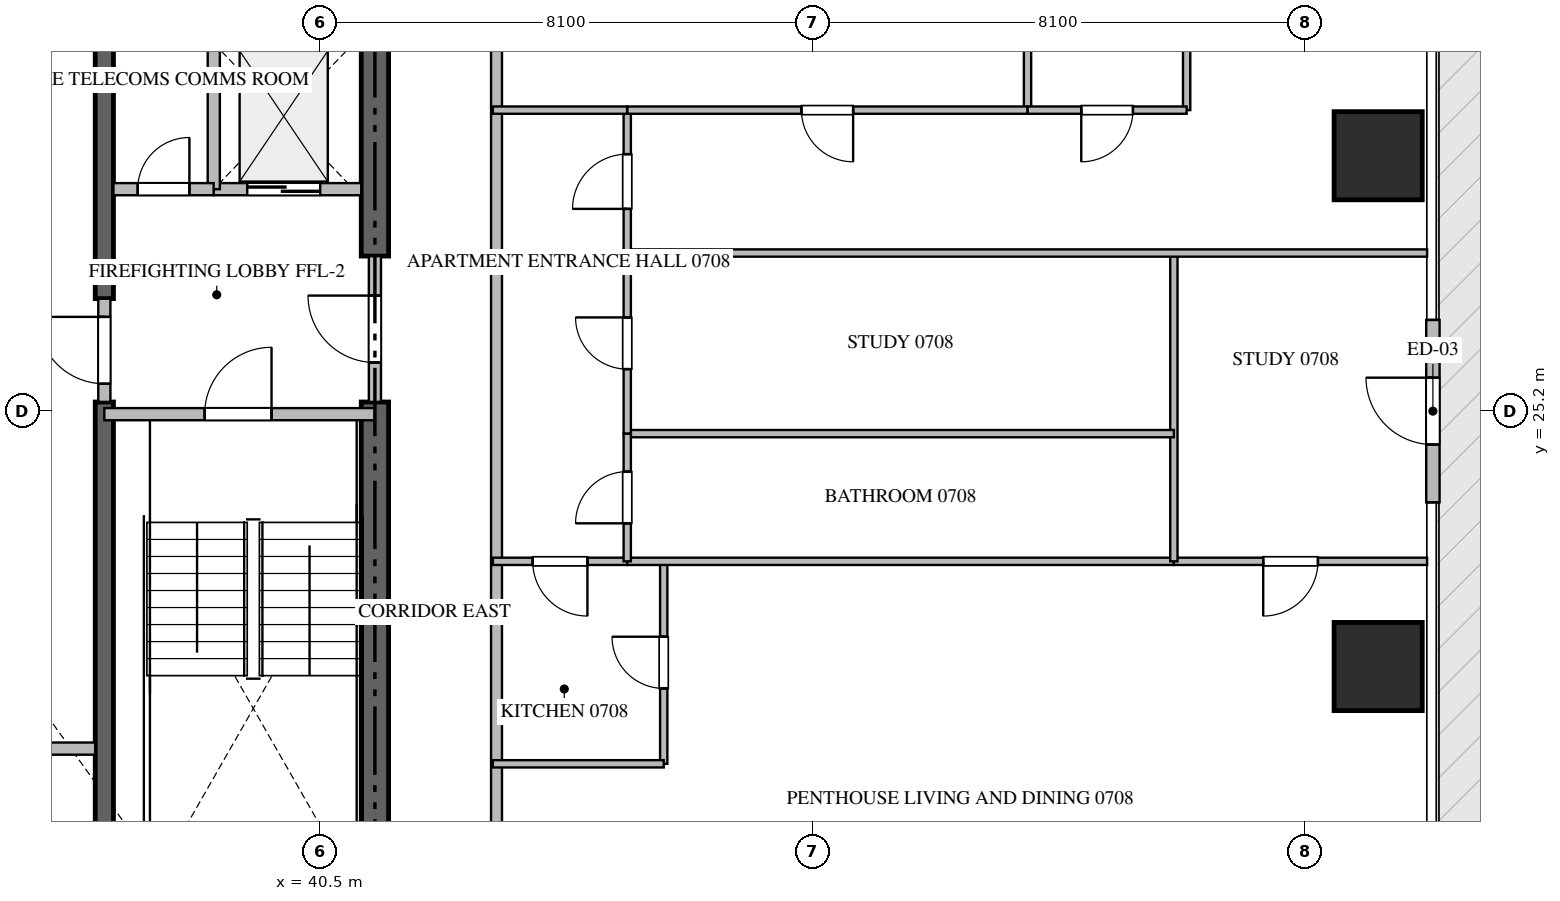
"""IFC4 building model, lengths in metres.
Left out: names, types, materials, properties, quantities, classifications, styles, units other than length and angle.
Written with IfcOpenShell. Run it as: python <this file> out.ifc"""

import sys

from ifc_helpers import new_model, si_unit, direction, frame, frame_2d, origin, origin_2d, place, context, subcontext, project, spatial, rectangle, extrude, source, transform, mapped, element, fill, save


model = new_model("IFC4")
c1 = context("Model", 3, precision=1e-05, world=origin(), true_north=direction((0.0, 1.0)))
c2 = subcontext(c1, "Body", "Model", "MODEL_VIEW")
j1 = project(units=[si_unit("LENGTHUNIT", "METRE"), si_unit("PLANEANGLEUNIT", "RADIAN")], contexts=[c1])
p1 = place(None, origin())
s1 = spatial("IfcSite", under=j1, at=p1, CompositionType="ELEMENT")
p2 = place(p1, origin())
s2 = spatial("IfcBuilding", under=s1, at=p2, CompositionType="ELEMENT")
p3 = place(p2, frame((0.0, 0.0, 34.2)))
s3 = spatial("IfcBuildingStorey", under=s2, at=p3, CompositionType="ELEMENT", Elevation=34.2)
p4 = place(p3, frame((41.4, 17.025, -0.26), z_axis=(0.0, 0.0, 1.0), x_axis=(0.0, 1.0, 0.0)))
e1 = element("IfcWall", 1, at=p4, inside=s3, PredefinedType="SHEAR", context=c2, shape_type="SweptSolid", body=[
    extrude(rectangle(XDim=8.325, YDim=0.45, at=frame_2d((4.163, 0.0))), origin(), (0.0, 0.0, 1.0), 3.748),
])
p5 = place(p3, frame((41.4, 27.75, -0.26), z_axis=(0.0, 0.0, 1.0), x_axis=(0.0, 1.0, 0.0)))
e2 = element("IfcWall", 2, at=p5, inside=s3, PredefinedType="SHEAR", context=c2, shape_type="SweptSolid", body=[
    extrude(rectangle(XDim=5.625, YDim=0.45, at=frame_2d((2.812, 0.0))), origin(), (0.0, 0.0, 1.0), 3.748),
])
p6 = place(p3, frame((36.95, 17.025, -0.26), z_axis=(0.0, 0.0, 1.0), x_axis=(0.0, 1.0, 0.0)))
e3 = element("IfcWall", 3, at=p6, inside=s3, PredefinedType="SHEAR", context=c2, shape_type="SweptSolid", body=[
    extrude(rectangle(XDim=8.325, YDim=0.3, at=frame_2d((4.163, 0.0))), origin(), (0.0, 0.0, 1.0), 3.748),
])
p7 = place(p3, frame((36.95, 27.05, -0.26), z_axis=(0.0, 0.0, 1.0), x_axis=(0.0, 1.0, 0.0)))
e4 = element("IfcWall", 4, at=p7, inside=s3, PredefinedType="SHEAR", context=c2, shape_type="SweptSolid", body=[
    extrude(rectangle(XDim=6.325, YDim=0.3, at=frame_2d((3.163, 0.0))), origin(), (0.0, 0.0, 1.0), 3.748),
])
m1 = source(origin(), c2, "Body", "SweptSolid", [
    extrude(rectangle(XDim=1.45, YDim=1.45, at=origin_2d()), origin(), (0.0, 0.0, 1.0), 3.75),
])
for number, where, z_axis, x_axis in (
    (5, (57.9, 21.0, -0.26), (0.0, 0.0, 1.0), (1.0, 0.0, 0.0)),
    (6, (57.9, 29.4, -0.26), (0.0, 0.0, 1.0), (1.0, 0.0, 0.0)),
):
    element("IfcColumn", number, at=place(p3, frame(where, z_axis=z_axis, x_axis=x_axis)), inside=s3, PredefinedType="COLUMN", context=c2, shape_type="MappedRepresentation", body=[
        mapped(m1, transform((0.0, 0.0, 0.0), scale=1.0)),
    ])
p8 = place(p3, frame((58.8, 23.7, 0.0), z_axis=(0.0, 0.0, 1.0), x_axis=(0.0, 1.0, 0.0)))
e7 = element("IfcWall", 7, at=p8, inside=s3, PredefinedType="ELEMENTEDWALL", context=c2, shape_type="SweptSolid", body=[
    extrude(rectangle(XDim=3.0, YDim=0.22, at=frame_2d((1.5, 0.0))), origin(), (0.0, 0.0, 1.0), 3.475),
])
p9 = place(p8, frame((0.95, 0.0, 0.0)))
e8 = element("IfcOpeningElement", 8, at=p9, cuts=e7, PredefinedType="OPENING", context=c2, shape_type="SweptSolid", body=[
    extrude(rectangle(XDim=1.1, YDim=2.2, at=frame_2d((0.55, 1.1))), frame((0.0, 0.12, 0.0), z_axis=(0.0, -1.0, 0.0), x_axis=(1.0, 0.0, 0.0)), (0.0, 0.0, 1.0), 0.24),
])
p10 = place(p3, frame((36.95, 25.15, 0.0), z_axis=(0.0, 0.0, 1.0), x_axis=(1.0, 0.0, 0.0)))
e9 = element("IfcWall", 9, at=p10, inside=s3, PredefinedType="STANDARD", context=c2, shape_type="SweptSolid", body=[
    extrude(rectangle(XDim=4.45, YDim=0.2, at=frame_2d((2.225, 0.0))), origin(), (0.0, 0.0, 1.0), 3.49),
])
p11 = place(p10, frame((1.65, 0.0, 0.0)))
e10 = element("IfcOpeningElement", 10, at=p11, cuts=e9, PredefinedType="OPENING", context=c2, shape_type="SweptSolid", body=[
    extrude(rectangle(XDim=1.1, YDim=2.15, at=frame_2d((0.55, 1.075))), frame((0.0, 0.11, 0.0), z_axis=(0.0, -1.0, 0.0), x_axis=(1.0, 0.0, 0.0)), (0.0, 0.0, 1.0), 0.22),
])
p12 = place(p3, frame((38.75, 28.85, 0.0), z_axis=(0.0, 0.0, 1.0), x_axis=(1.0, 0.0, 0.0)))
e11 = element("IfcWall", 11, at=p12, inside=s3, PredefinedType="STANDARD", context=c2, shape_type="SweptSolid", body=[
    extrude(rectangle(XDim=2.425, YDim=0.2, at=frame_2d((1.212, 0.0))), origin(), (0.0, 0.0, 1.0), 3.49),
])
p13 = place(p12, frame((0.55, 0.0, 0.0)))
e12 = element("IfcOpeningElement", 12, at=p13, cuts=e11, PredefinedType="OPENING", context=c2, shape_type="SweptSolid", body=[
    extrude(rectangle(XDim=1.2, YDim=2.2, at=frame_2d((0.6, 1.1))), frame((0.0, 0.11, 0.0), z_axis=(0.0, -1.0, 0.0), x_axis=(1.0, 0.0, 0.0)), (0.0, 0.0, 1.0), 0.22),
])
p14 = place(p3, frame((33.05, 19.65, 0.0), z_axis=(0.0, 0.0, 1.0), x_axis=(1.0, 0.0, 0.0)))
e13 = element("IfcWall", 13, at=p14, inside=s3, PredefinedType="STANDARD", context=c2, shape_type="SweptSolid", body=[
    extrude(rectangle(XDim=3.75, YDim=0.2, at=frame_2d((1.875, 0.0))), origin(), (0.0, 0.0, 1.0), 3.49),
])
p15 = place(p14, frame((0.65, 0.0, 0.0)))
e14 = element("IfcOpeningElement", 14, at=p15, cuts=e13, PredefinedType="OPENING", context=c2, shape_type="SweptSolid", body=[
    extrude(rectangle(XDim=1.1, YDim=2.2, at=frame_2d((0.55, 1.1))), frame((0.0, 0.11, 0.0), z_axis=(0.0, -1.0, 0.0), x_axis=(1.0, 0.0, 0.0)), (0.0, 0.0, 1.0), 0.22),
])
p16 = place(p3, frame((35.0, 30.65, 0.0), z_axis=(0.0, 0.0, 1.0), x_axis=(1.0, 0.0, 0.0)))
e15 = element("IfcWall", 15, at=p16, inside=s3, PredefinedType="STANDARD", context=c2, shape_type="SweptSolid", body=[
    extrude(rectangle(XDim=1.8, YDim=0.2, at=frame_2d((0.9, 0.0))), origin(), (0.0, 0.0, 1.0), 3.49),
])
p17 = place(p3, frame((38.75, 28.85, 0.0), z_axis=(0.0, 0.0, 1.0), x_axis=(0.0, 1.0, 0.0)))
e16 = element("IfcWall", 16, at=p17, inside=s3, PredefinedType="STANDARD", context=c2, shape_type="SweptSolid", body=[
    extrude(rectangle(XDim=2.5, YDim=0.2, at=frame_2d((1.25, 0.0))), origin(), (0.0, 0.0, 1.0), 3.49),
])
p18 = place(p3, frame((37.1, 28.85, 0.0), z_axis=(0.0, 0.0, 1.0), x_axis=(1.0, 0.0, 0.0)))
e17 = element("IfcWall", 17, at=p18, inside=s3, PredefinedType="STANDARD", context=c2, shape_type="SweptSolid", body=[
    extrude(rectangle(XDim=1.648, YDim=0.2, at=frame_2d((0.824, 0.0))), origin(), (0.0, 0.0, 1.0), 3.49),
])
p19 = place(p18, frame((0.399, 0.0, 0.0)))
e18 = element("IfcOpeningElement", 18, at=p19, cuts=e17, PredefinedType="OPENING", context=c2, shape_type="SweptSolid", body=[
    extrude(rectangle(XDim=0.85, YDim=2.1, at=frame_2d((0.425, 1.05))), frame((0.0, 0.11, 0.0), z_axis=(0.0, -1.0, 0.0), x_axis=(1.0, 0.0, 0.0)), (0.0, 0.0, 1.0), 0.22),
])
p20 = place(p3, frame((41.4, 25.352, 0.0), z_axis=(0.0, 0.0, 1.0), x_axis=(0.0, 1.0, 0.0)))
e19 = element("IfcWall", 19, at=p20, inside=s3, PredefinedType="STANDARD", context=c2, shape_type="SweptSolid", body=[
    extrude(rectangle(XDim=2.396, YDim=0.2, at=frame_2d((1.198, 0.0))), origin(), (0.0, 0.0, 1.0), 3.49),
])
p21 = place(p20, frame((0.648, 0.0, 0.0)))
e20 = element("IfcOpeningElement", 20, at=p21, cuts=e19, PredefinedType="OPENING", context=c2, shape_type="SweptSolid", body=[
    extrude(rectangle(XDim=1.1, YDim=2.15, at=frame_2d((0.55, 1.075))), frame((0.0, 0.11, 0.0), z_axis=(0.0, -1.0, 0.0), x_axis=(1.0, 0.0, 0.0)), (0.0, 0.0, 1.0), 0.22),
])
p22 = place(p3, frame((36.95, 25.352, 0.0), z_axis=(0.0, 0.0, 1.0), x_axis=(0.0, 1.0, 0.0)))
e21 = element("IfcWall", 21, at=p22, inside=s3, PredefinedType="STANDARD", context=c2, shape_type="SweptSolid", body=[
    extrude(rectangle(XDim=1.696, YDim=0.2, at=frame_2d((0.848, 0.0))), origin(), (0.0, 0.0, 1.0), 3.49),
])
p23 = place(p22, frame((0.298, 0.0, 0.0)))
e22 = element("IfcOpeningElement", 22, at=p23, cuts=e21, PredefinedType="OPENING", context=c2, shape_type="SweptSolid", body=[
    extrude(rectangle(XDim=1.1, YDim=2.15, at=frame_2d((0.55, 1.075))), frame((0.0, 0.11, 0.0), z_axis=(0.0, -1.0, 0.0), x_axis=(1.0, 0.0, 0.0)), (0.0, 0.0, 1.0), 0.22),
])
p24 = place(p3, frame((43.4, 14.9, 0.0), z_axis=(0.0, 0.0, 1.0), x_axis=(0.0, 1.0, 0.0)))
e23 = element("IfcWall", 23, at=p24, inside=s3, PredefinedType="PARTITIONING", context=c2, shape_type="SweptSolid", body=[
    extrude(rectangle(XDim=20.6, YDim=0.18, at=frame_2d((10.3, 0.0))), origin(), (0.0, 0.0, 1.0), 3.49),
])
p25 = place(p24, frame((1.96, 0.0, 0.0)))
e24 = element("IfcOpeningElement", 24, at=p25, cuts=e23, PredefinedType="OPENING", context=c2, shape_type="SweptSolid", body=[
    extrude(rectangle(XDim=1.0, YDim=2.15, at=frame_2d((0.5, 1.075))), frame((0.0, 0.1, 0.0), z_axis=(0.0, -1.0, 0.0), x_axis=(1.0, 0.0, 0.0)), (0.0, 0.0, 1.0), 0.2),
])
p26 = place(p3, frame((46.15, 19.4, 0.0), z_axis=(0.0, 0.0, 1.0), x_axis=(0.0, 1.0, 0.0)))
e25 = element("IfcWall", 25, at=p26, inside=s3, PredefinedType="PARTITIONING", context=c2, shape_type="SweptSolid", body=[
    extrude(rectangle(XDim=3.33, YDim=0.12, at=frame_2d((1.665, 0.0))), origin(), (0.0, 0.0, 1.0), 3.49),
])
p27 = place(p26, frame((1.24, 0.0, 0.0)))
e26 = element("IfcOpeningElement", 26, at=p27, cuts=e25, PredefinedType="OPENING", context=c2, shape_type="SweptSolid", body=[
    extrude(rectangle(XDim=0.85, YDim=2.1, at=frame_2d((0.425, 1.05))), frame((0.0, 0.07, 0.0), z_axis=(0.0, -1.0, 0.0), x_axis=(1.0, 0.0, 0.0)), (0.0, 0.0, 1.0), 0.14),
])
p28 = place(p3, frame((46.15, 19.4, 0.0), z_axis=(0.0, 0.0, 1.0), x_axis=(-1.0, 0.0, 0.0)))
e27 = element("IfcWall", 27, at=p28, inside=s3, PredefinedType="PARTITIONING", context=c2, shape_type="SweptSolid", body=[
    extrude(rectangle(XDim=2.81, YDim=0.12, at=frame_2d((1.405, 0.0))), origin(), (0.0, 0.0, 1.0), 3.49),
])
p29 = place(p3, frame((45.55, 22.73, 0.0), z_axis=(0.0, 0.0, 1.0), x_axis=(-1.0, 0.0, 0.0)))
e28 = element("IfcWall", 28, at=p29, inside=s3, PredefinedType="PARTITIONING", context=c2, shape_type="SweptSolid", body=[
    extrude(rectangle(XDim=2.21, YDim=0.12, at=frame_2d((1.105, 0.0))), origin(), (0.0, 0.0, 1.0), 3.49),
])
p30 = place(p29, frame((0.655, 0.0, 0.0)))
e29 = element("IfcOpeningElement", 29, at=p30, cuts=e28, PredefinedType="OPENING", context=c2, shape_type="SweptSolid", body=[
    extrude(rectangle(XDim=0.9, YDim=2.1, at=frame_2d((0.45, 1.05))), frame((0.0, 0.07, 0.0), z_axis=(0.0, -1.0, 0.0), x_axis=(1.0, 0.0, 0.0)), (0.0, 0.0, 1.0), 0.14),
])
p31 = place(p3, frame((58.705, 22.73, 0.0), z_axis=(0.0, 0.0, 1.0), x_axis=(-1.0, 0.0, 0.0)))
e30 = element("IfcWall", 30, at=p31, inside=s3, PredefinedType="PARTITIONING", context=c2, shape_type="SweptSolid", body=[
    extrude(rectangle(XDim=4.165, YDim=0.12, at=frame_2d((2.083, 0.0))), origin(), (0.0, 0.0, 1.0), 3.49),
])
p32 = place(p31, frame((1.796, 0.0, 0.0)))
e31 = element("IfcOpeningElement", 31, at=p32, cuts=e30, PredefinedType="OPENING", context=c2, shape_type="SweptSolid", body=[
    extrude(rectangle(XDim=0.9, YDim=2.1, at=frame_2d((0.45, 1.05))), frame((0.0, 0.07, 0.0), z_axis=(0.0, -1.0, 0.0), x_axis=(1.0, 0.0, 0.0)), (0.0, 0.0, 1.0), 0.14),
])
p33 = place(p3, frame((54.538, 22.73, 0.0), z_axis=(0.0, 0.0, 1.0), x_axis=(-1.0, 0.0, 0.0)))
e32 = element("IfcWall", 32, at=p33, inside=s3, PredefinedType="PARTITIONING", context=c2, shape_type="SweptSolid", body=[
    extrude(rectangle(XDim=8.986, YDim=0.12, at=frame_2d((4.493, 0.0))), origin(), (0.0, 0.0, 1.0), 3.49),
])
p34 = place(p3, frame((54.54, 22.73, 0.0), z_axis=(0.0, 0.0, 1.0), x_axis=(0.0, 1.0, 0.0)))
e33 = element("IfcWall", 33, at=p34, inside=s3, PredefinedType="PARTITIONING", context=c2, shape_type="SweptSolid", body=[
    extrude(rectangle(XDim=5.07, YDim=0.12, at=frame_2d((2.535, 0.0))), origin(), (0.0, 0.0, 1.0), 3.49),
])
p35 = place(p3, frame((58.705, 27.8, 0.0), z_axis=(0.0, 0.0, 1.0), x_axis=(-1.0, 0.0, 0.0)))
e34 = element("IfcWall", 34, at=p35, inside=s3, PredefinedType="PARTITIONING", context=c2, shape_type="SweptSolid", body=[
    extrude(rectangle(XDim=13.155, YDim=0.12, at=frame_2d((6.578, 0.0))), origin(), (0.0, 0.0, 1.0), 3.49),
])
p36 = place(p3, frame((54.54, 24.83, 0.0), z_axis=(0.0, 0.0, 1.0), x_axis=(-1.0, 0.0, 0.0)))
e35 = element("IfcWall", 35, at=p36, inside=s3, PredefinedType="PARTITIONING", context=c2, shape_type="SweptSolid", body=[
    extrude(rectangle(XDim=8.99, YDim=0.12, at=frame_2d((4.495, 0.0))), origin(), (0.0, 0.0, 1.0), 3.49),
])
p37 = place(p3, frame((45.55, 22.73, 0.0), z_axis=(0.0, 0.0, 1.0), x_axis=(0.0, 1.0, 0.0)))
e36 = element("IfcWall", 36, at=p37, inside=s3, PredefinedType="PARTITIONING", context=c2, shape_type="SweptSolid", body=[
    extrude(rectangle(XDim=2.1, YDim=0.12, at=frame_2d((1.05, 0.0))), origin(), (0.0, 0.0, 1.0), 3.49),
])
p38 = place(p37, frame((0.625, 0.0, 0.0)))
e37 = element("IfcOpeningElement", 37, at=p38, cuts=e36, PredefinedType="OPENING", context=c2, shape_type="SweptSolid", body=[
    extrude(rectangle(XDim=0.85, YDim=2.1, at=frame_2d((0.425, 1.05))), frame((0.0, 0.07, 0.0), z_axis=(0.0, -1.0, 0.0), x_axis=(1.0, 0.0, 0.0)), (0.0, 0.0, 1.0), 0.14),
])
p39 = place(p3, frame((45.55, 24.832, 0.0), z_axis=(0.0, 0.0, 1.0), x_axis=(0.0, 1.0, 0.0)))
e38 = element("IfcWall", 38, at=p39, inside=s3, PredefinedType="PARTITIONING", context=c2, shape_type="SweptSolid", body=[
    extrude(rectangle(XDim=2.968, YDim=0.12, at=frame_2d((1.484, 0.0))), origin(), (0.0, 0.0, 1.0), 3.49),
])
p40 = place(p39, frame((1.059, 0.0, 0.0)))
e39 = element("IfcOpeningElement", 39, at=p40, cuts=e38, PredefinedType="OPENING", context=c2, shape_type="SweptSolid", body=[
    extrude(rectangle(XDim=0.85, YDim=2.1, at=frame_2d((0.425, 1.05))), frame((0.0, 0.07, 0.0), z_axis=(0.0, -1.0, 0.0), x_axis=(1.0, 0.0, 0.0)), (0.0, 0.0, 1.0), 0.14),
])
p41 = place(p3, frame((45.55, 27.802, 0.0), z_axis=(0.0, 0.0, 1.0), x_axis=(0.0, 1.0, 0.0)))
e40 = element("IfcWall", 40, at=p41, inside=s3, PredefinedType="PARTITIONING", context=c2, shape_type="SweptSolid", body=[
    extrude(rectangle(XDim=2.348, YDim=0.12, at=frame_2d((1.174, 0.0))), origin(), (0.0, 0.0, 1.0), 3.49),
])
p42 = place(p41, frame((0.724, 0.0, 0.0)))
e41 = element("IfcOpeningElement", 41, at=p42, cuts=e40, PredefinedType="OPENING", context=c2, shape_type="SweptSolid", body=[
    extrude(rectangle(XDim=0.9, YDim=2.1, at=frame_2d((0.45, 1.05))), frame((0.0, 0.07, 0.0), z_axis=(0.0, -1.0, 0.0), x_axis=(1.0, 0.0, 0.0)), (0.0, 0.0, 1.0), 0.14),
])
for number, where, z_axis, x_axis in (
    (42, (54.75, 30.15, 0.0), (0.0, 0.0, 1.0), (0.0, 1.0, 0.0)),
    (43, (52.133, 30.15, 0.0), (0.0, 0.0, 1.0), (0.0, 1.0, 0.0)),
):
    element("IfcWall", number, at=place(p3, frame(where, z_axis=z_axis, x_axis=x_axis)), inside=s3, PredefinedType="PARTITIONING", context=c2, shape_type="SweptSolid", body=[
        extrude(rectangle(XDim=5.41, YDim=0.12, at=frame_2d((2.705, 0.0))), origin(), (0.0, 0.0, 1.0), 3.49),
    ])
p43 = place(p3, frame((54.75, 30.15, 0.0), z_axis=(0.0, 0.0, 1.0), x_axis=(-1.0, 0.0, 0.0)))
e44 = element("IfcWall", 44, at=p43, inside=s3, PredefinedType="PARTITIONING", context=c2, shape_type="SweptSolid", body=[
    extrude(rectangle(XDim=2.617, YDim=0.12, at=frame_2d((1.309, 0.0))), origin(), (0.0, 0.0, 1.0), 3.49),
])
p44 = place(p43, frame((0.883, 0.0, 0.0)))
e45 = element("IfcOpeningElement", 45, at=p44, cuts=e44, PredefinedType="OPENING", context=c2, shape_type="SweptSolid", body=[
    extrude(rectangle(XDim=0.85, YDim=2.1, at=frame_2d((0.425, 1.05))), frame((0.0, 0.07, 0.0), z_axis=(0.0, -1.0, 0.0), x_axis=(1.0, 0.0, 0.0)), (0.0, 0.0, 1.0), 0.14),
])
p45 = place(p3, frame((52.131, 30.15, 0.0), z_axis=(0.0, 0.0, 1.0), x_axis=(-1.0, 0.0, 0.0)))
e46 = element("IfcWall", 46, at=p45, inside=s3, PredefinedType="PARTITIONING", context=c2, shape_type="SweptSolid", body=[
    extrude(rectangle(XDim=6.581, YDim=0.12, at=frame_2d((3.291, 0.0))), origin(), (0.0, 0.0, 1.0), 3.49),
])
p46 = place(p45, frame((2.866, 0.0, 0.0)))
e47 = element("IfcOpeningElement", 47, at=p46, cuts=e46, PredefinedType="OPENING", context=c2, shape_type="SweptSolid", body=[
    extrude(rectangle(XDim=0.85, YDim=2.1, at=frame_2d((0.425, 1.05))), frame((0.0, 0.07, 0.0), z_axis=(0.0, -1.0, 0.0), x_axis=(1.0, 0.0, 0.0)), (0.0, 0.0, 1.0), 0.14),
])
p47 = place(p3, frame((45.548, 30.15, 0.0), z_axis=(0.0, 0.0, 1.0), x_axis=(-1.0, 0.0, 0.0)))
e48 = element("IfcWall", 48, at=p47, inside=s3, PredefinedType="PARTITIONING", context=c2, shape_type="SweptSolid", body=[
    extrude(rectangle(XDim=2.208, YDim=0.12, at=frame_2d((1.104, 0.0))), origin(), (0.0, 0.0, 1.0), 3.49),
])
m2 = source(origin(), c2, "Body", "SweptSolid", [
    extrude(rectangle(XDim=1.1, YDim=2.2, at=frame_2d((0.55, 1.1))), frame((0.0, 0.025, 0.0), z_axis=(0.0, -1.0, 0.0), x_axis=(1.0, 0.0, 0.0)), (0.0, 0.0, 1.0), 0.05),
])
p48 = place(p9, origin())
e49 = element("IfcDoor", 49, at=p48, inside=s3, OperationType="SINGLE_SWING_RIGHT", PredefinedType="DOOR", context=c2, shape_type="MappedRepresentation", body=[
    mapped(m2, transform((0.0, 0.0, 0.0), scale=1.0)),
])
fill(e8, e49)
m3 = source(origin(), c2, "Body", "SweptSolid", [
    extrude(rectangle(XDim=1.1, YDim=2.15, at=frame_2d((0.55, 1.075))), frame((0.0, 0.025, 0.0), z_axis=(0.0, -1.0, 0.0), x_axis=(1.0, 0.0, 0.0)), (0.0, 0.0, 1.0), 0.05),
])
p49 = place(p11, origin())
e50 = element("IfcDoor", 50, at=p49, inside=s3, OperationType="SINGLE_SWING_RIGHT", PredefinedType="DOOR", context=c2, shape_type="MappedRepresentation", body=[
    mapped(m3, transform((0.0, 0.0, 0.0), scale=1.0)),
])
fill(e10, e50)
m4 = source(origin(), c2, "Body", "SweptSolid", [
    extrude(rectangle(XDim=1.2, YDim=2.2, at=frame_2d((0.6, 1.1))), frame((0.0, 0.025, 0.0), z_axis=(0.0, -1.0, 0.0), x_axis=(1.0, 0.0, 0.0)), (0.0, 0.0, 1.0), 0.05),
])
p50 = place(p13, origin())
e51 = element("IfcDoor", 51, at=p50, inside=s3, OperationType="DOUBLE_DOOR_SLIDING", PredefinedType="DOOR", context=c2, shape_type="MappedRepresentation", body=[
    mapped(m4, transform((0.0, 0.0, 0.0), scale=1.0)),
])
fill(e12, e51)
m5 = source(origin(), c2, "Body", "SweptSolid", [
    extrude(rectangle(XDim=0.85, YDim=2.1, at=frame_2d((0.425, 1.05))), frame((0.0, 0.025, 0.0), z_axis=(0.0, -1.0, 0.0), x_axis=(1.0, 0.0, 0.0)), (0.0, 0.0, 1.0), 0.05),
])
p51 = place(p19, origin())
e52 = element("IfcDoor", 52, at=p51, inside=s3, OperationType="SINGLE_SWING_RIGHT", PredefinedType="DOOR", context=c2, shape_type="MappedRepresentation", body=[
    mapped(m5, transform((0.0, 0.0, 0.0), scale=1.0)),
])
fill(e18, e52)
p52 = place(p21, origin())
e53 = element("IfcDoor", 53, at=p52, inside=s3, OperationType="SINGLE_SWING_RIGHT", PredefinedType="DOOR", context=c2, shape_type="MappedRepresentation", body=[
    mapped(m3, transform((0.0, 0.0, 0.0), scale=1.0)),
])
fill(e20, e53)
p53 = place(p23, origin())
e54 = element("IfcDoor", 54, at=p53, inside=s3, OperationType="SINGLE_SWING_RIGHT", PredefinedType="DOOR", context=c2, shape_type="MappedRepresentation", body=[
    mapped(m3, transform((0.0, 0.0, 0.0), scale=1.0)),
])
fill(e22, e54)
p54 = place(p27, origin())
e55 = element("IfcDoor", 55, at=p54, inside=s3, OperationType="SINGLE_SWING_RIGHT", PredefinedType="DOOR", context=c2, shape_type="MappedRepresentation", body=[
    mapped(m5, transform((0.0, 0.0, 0.0), scale=1.0)),
])
fill(e26, e55)
m6 = source(origin(), c2, "Body", "SweptSolid", [
    extrude(rectangle(XDim=0.9, YDim=2.1, at=frame_2d((0.45, 1.05))), frame((0.0, 0.025, 0.0), z_axis=(0.0, -1.0, 0.0), x_axis=(1.0, 0.0, 0.0)), (0.0, 0.0, 1.0), 0.05),
])
p55 = place(p30, origin())
e56 = element("IfcDoor", 56, at=p55, inside=s3, OperationType="SINGLE_SWING_LEFT", PredefinedType="DOOR", context=c2, shape_type="MappedRepresentation", body=[
    mapped(m6, transform((0.0, 0.0, 0.0), scale=1.0)),
])
fill(e29, e56)
p56 = place(p32, origin())
e57 = element("IfcDoor", 57, at=p56, inside=s3, OperationType="SINGLE_SWING_RIGHT", PredefinedType="DOOR", context=c2, shape_type="MappedRepresentation", body=[
    mapped(m6, transform((0.0, 0.0, 0.0), scale=1.0)),
])
fill(e31, e57)
p57 = place(p38, origin())
e58 = element("IfcDoor", 58, at=p57, inside=s3, OperationType="SINGLE_SWING_LEFT", PredefinedType="DOOR", context=c2, shape_type="MappedRepresentation", body=[
    mapped(m5, transform((0.0, 0.0, 0.0), scale=1.0)),
])
fill(e37, e58)
p58 = place(p40, origin())
e59 = element("IfcDoor", 59, at=p58, inside=s3, OperationType="SINGLE_SWING_RIGHT", PredefinedType="DOOR", context=c2, shape_type="MappedRepresentation", body=[
    mapped(m5, transform((0.0, 0.0, 0.0), scale=1.0)),
])
fill(e39, e59)
p59 = place(p42, origin())
e60 = element("IfcDoor", 60, at=p59, inside=s3, OperationType="SINGLE_SWING_LEFT", PredefinedType="DOOR", context=c2, shape_type="MappedRepresentation", body=[
    mapped(m6, transform((0.0, 0.0, 0.0), scale=1.0)),
])
fill(e41, e60)
p60 = place(p44, origin())
e61 = element("IfcDoor", 61, at=p60, inside=s3, OperationType="SINGLE_SWING_RIGHT", PredefinedType="DOOR", context=c2, shape_type="MappedRepresentation", body=[
    mapped(m5, transform((0.0, 0.0, 0.0), scale=1.0)),
])
fill(e45, e61)
p61 = place(p46, origin())
e62 = element("IfcDoor", 62, at=p61, inside=s3, OperationType="SINGLE_SWING_LEFT", PredefinedType="DOOR", context=c2, shape_type="MappedRepresentation", body=[
    mapped(m5, transform((0.0, 0.0, 0.0), scale=1.0)),
])
fill(e47, e62)
save(model, sys.argv[1])
